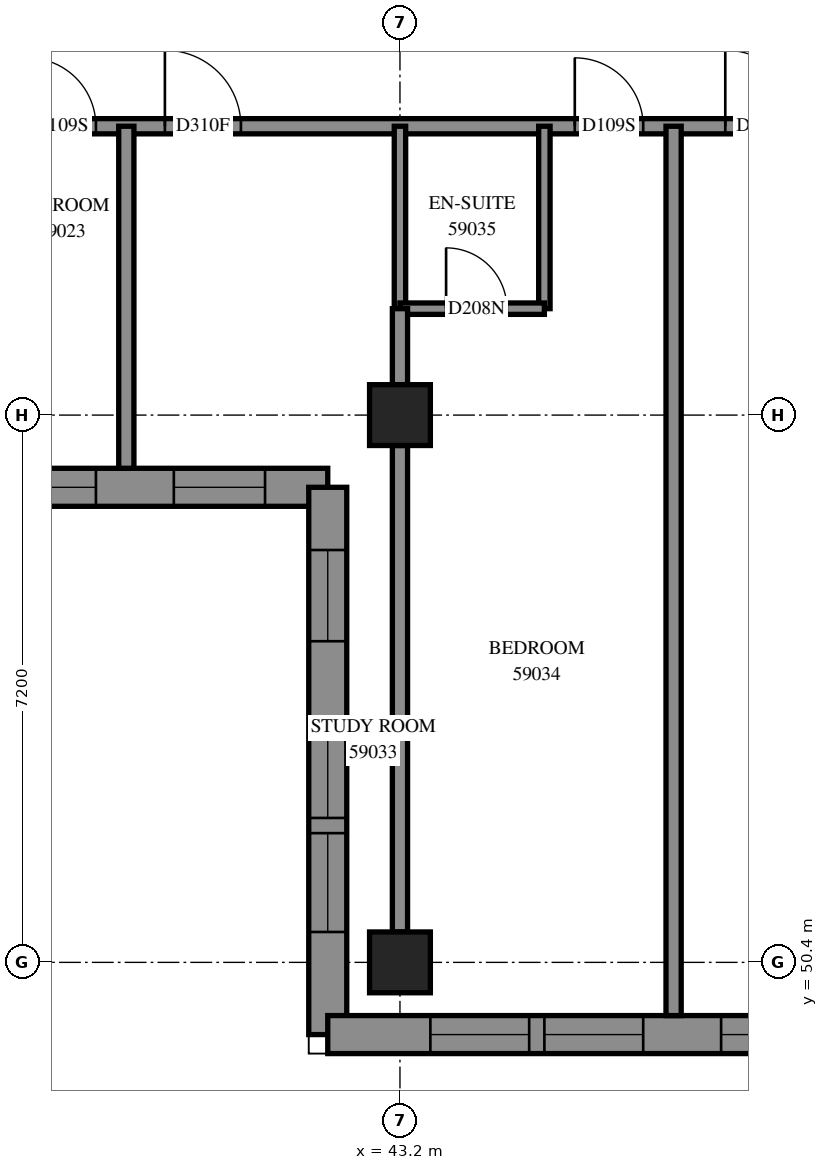
"""IFC4 building model, lengths in metres.
Left out: names, types, materials, properties, quantities, classifications, styles, units other than length and angle.
Written with IfcOpenShell. Run it as: python <this file> out.ifc"""

import sys

from ifc_helpers import new_model, si_unit, direction, frame, frame_2d, origin, origin_2d, place, context, subcontext, project, spatial, polyline, rectangle, outline, extrude, element, fill, save


model = new_model("IFC4")
c1 = context("Model", 3, precision=1e-05, world=origin(), true_north=direction((0.0, 1.0)))
c2 = subcontext(c1, "Body", "Model", "MODEL_VIEW")
j1 = project(units=[si_unit("LENGTHUNIT", "METRE"), si_unit("PLANEANGLEUNIT", "RADIAN")], contexts=[c1])
p1 = place(None, origin())
s1 = spatial("IfcSite", under=j1, at=p1, CompositionType="ELEMENT")
p2 = place(p1, origin())
s2 = spatial("IfcBuilding", under=s1, at=p2, CompositionType="ELEMENT")
p3 = place(p2, frame((0.0, 0.0, 216.8)))
s3 = spatial("IfcBuildingStorey", under=s2, at=p3, CompositionType="ELEMENT", Elevation=216.8)
for number, where, z_axis, x_axis in (
    (1, (43.2, 50.4, 0.0), (0.0, 0.0, 1.0), (1.0, 0.0, 0.0)),
    (2, (43.2, 57.6, 0.0), (0.0, 0.0, 1.0), (1.0, 0.0, 0.0)),
):
    element("IfcColumn", number, at=place(p3, frame(where, z_axis=z_axis, x_axis=x_axis)), inside=s3, PredefinedType="COLUMN", context=c2, shape_type="SweptSolid", body=[
        extrude(rectangle(XDim=0.8, YDim=0.8, at=origin_2d()), origin(), (0.0, 0.0, 1.0), 3.1),
    ])
p4 = place(p3, frame((35.05, 56.65, 0.0), z_axis=(0.0, 0.0, 1.0), x_axis=(1.0, 0.0, 0.0)))
e3 = element("IfcWall", 3, at=p4, inside=s3, PredefinedType="SOLIDWALL", context=c2, shape_type="SweptSolid", body=[
    extrude(outline(polyline([(-0.25, -0.25), (6.95, -0.25), (7.45, 0.25), (0.25, 0.25), (-0.25, -0.25)])), origin(), (0.0, 0.0, 1.0), 3.1),
])
p5 = place(p4, frame((1.35, 0.0, 0.45)))
e4 = element("IfcOpeningElement", 4, at=p5, cuts=e3, PredefinedType="OPENING", context=c2, shape_type="SweptSolid", body=[
    extrude(rectangle(XDim=1.3, YDim=2.5, at=frame_2d((0.65, 1.25))), frame((0.0, 0.26, 0.0), z_axis=(0.0, -1.0, 0.0), x_axis=(1.0, 0.0, 0.0)), (0.0, 0.0, 1.0), 0.52),
])
p6 = place(p4, frame((2.85, 0.0, 0.45)))
e5 = element("IfcOpeningElement", 5, at=p6, cuts=e3, PredefinedType="OPENING", context=c2, shape_type="SweptSolid", body=[
    extrude(rectangle(XDim=1.3, YDim=2.5, at=frame_2d((0.65, 1.25))), frame((0.0, 0.26, 0.0), z_axis=(0.0, -1.0, 0.0), x_axis=(1.0, 0.0, 0.0)), (0.0, 0.0, 1.0), 0.52),
])
p7 = place(p4, frame((5.175, 0.0, 0.45)))
e6 = element("IfcOpeningElement", 6, at=p7, cuts=e3, PredefinedType="OPENING", context=c2, shape_type="SweptSolid", body=[
    extrude(rectangle(XDim=1.2, YDim=2.5, at=frame_2d((0.6, 1.25))), frame((0.0, 0.26, 0.0), z_axis=(0.0, -1.0, 0.0), x_axis=(1.0, 0.0, 0.0)), (0.0, 0.0, 1.0), 0.52),
])
p8 = place(p3, frame((42.25, 56.65, 0.0), z_axis=(0.0, 0.0, 1.0), x_axis=(0.0, -1.0, 0.0)))
e7 = element("IfcWall", 7, at=p8, inside=s3, PredefinedType="SOLIDWALL", context=c2, shape_type="SweptSolid", body=[
    extrude(outline(polyline([(0.25, -0.25), (7.45, -0.25), (6.95, 0.25), (-0.25, 0.25), (0.25, -0.25)])), origin(), (0.0, 0.0, 1.0), 3.1),
])
p9 = place(p8, frame((3.05, 0.0, 0.45)))
e8 = element("IfcOpeningElement", 8, at=p9, cuts=e7, PredefinedType="OPENING", context=c2, shape_type="SweptSolid", body=[
    extrude(rectangle(XDim=1.3, YDim=2.5, at=frame_2d((0.65, 1.25))), frame((0.0, 0.26, 0.0), z_axis=(0.0, -1.0, 0.0), x_axis=(1.0, 0.0, 0.0)), (0.0, 0.0, 1.0), 0.52),
])
p10 = place(p8, frame((4.55, 0.0, 0.45)))
e9 = element("IfcOpeningElement", 9, at=p10, cuts=e7, PredefinedType="OPENING", context=c2, shape_type="SweptSolid", body=[
    extrude(rectangle(XDim=1.3, YDim=2.5, at=frame_2d((0.65, 1.25))), frame((0.0, 0.26, 0.0), z_axis=(0.0, -1.0, 0.0), x_axis=(1.0, 0.0, 0.0)), (0.0, 0.0, 1.0), 0.52),
])
p11 = place(p8, frame((0.825, 0.0, 0.45)))
e10 = element("IfcOpeningElement", 10, at=p11, cuts=e7, PredefinedType="OPENING", context=c2, shape_type="SweptSolid", body=[
    extrude(rectangle(XDim=1.2, YDim=2.5, at=frame_2d((0.6, 1.25))), frame((0.0, 0.26, 0.0), z_axis=(0.0, -1.0, 0.0), x_axis=(1.0, 0.0, 0.0)), (0.0, 0.0, 1.0), 0.52),
])
p12 = place(p3, frame((42.25, 49.45, 0.0), z_axis=(0.0, 0.0, 1.0), x_axis=(1.0, 0.0, 0.0)))
e11 = element("IfcWall", 11, at=p12, inside=s3, PredefinedType="SOLIDWALL", context=c2, shape_type="SweptSolid", body=[
    extrude(outline(polyline([(-0.25, -0.25), (6.95, -0.25), (7.45, 0.25), (0.25, 0.25), (-0.25, -0.25)])), origin(), (0.0, 0.0, 1.0), 3.1),
])
p13 = place(p12, frame((1.35, 0.0, 0.45)))
e12 = element("IfcOpeningElement", 12, at=p13, cuts=e11, PredefinedType="OPENING", context=c2, shape_type="SweptSolid", body=[
    extrude(rectangle(XDim=1.3, YDim=2.5, at=frame_2d((0.65, 1.25))), frame((0.0, 0.26, 0.0), z_axis=(0.0, -1.0, 0.0), x_axis=(1.0, 0.0, 0.0)), (0.0, 0.0, 1.0), 0.52),
])
p14 = place(p12, frame((2.85, 0.0, 0.45)))
e13 = element("IfcOpeningElement", 13, at=p14, cuts=e11, PredefinedType="OPENING", context=c2, shape_type="SweptSolid", body=[
    extrude(rectangle(XDim=1.3, YDim=2.5, at=frame_2d((0.65, 1.25))), frame((0.0, 0.26, 0.0), z_axis=(0.0, -1.0, 0.0), x_axis=(1.0, 0.0, 0.0)), (0.0, 0.0, 1.0), 0.52),
])
p15 = place(p12, frame((5.175, 0.0, 0.45)))
e14 = element("IfcOpeningElement", 14, at=p15, cuts=e11, PredefinedType="OPENING", context=c2, shape_type="SweptSolid", body=[
    extrude(rectangle(XDim=1.2, YDim=2.5, at=frame_2d((0.6, 1.25))), frame((0.0, 0.26, 0.0), z_axis=(0.0, -1.0, 0.0), x_axis=(1.0, 0.0, 0.0)), (0.0, 0.0, 1.0), 0.52),
])
p16 = place(p3, frame((36.0, 61.4, 0.0), z_axis=(0.0, 0.0, 1.0), x_axis=(1.0, 0.0, 0.0)))
e15 = element("IfcWall", 15, at=p16, inside=s3, PredefinedType="PARTITIONING", context=c2, shape_type="SweptSolid", body=[
    extrude(rectangle(XDim=17.0, YDim=0.2, at=frame_2d((8.5, 0.0))), origin(), (0.0, 0.0, 1.0), 3.1),
])
p17 = place(p16, frame((2.3, 0.0, 0.0)))
e16 = element("IfcOpeningElement", 16, at=p17, cuts=e15, PredefinedType="OPENING", context=c2, shape_type="SweptSolid", body=[
    extrude(rectangle(XDim=0.9, YDim=2.1, at=frame_2d((0.45, 1.05))), frame((0.0, 0.11, 0.0), z_axis=(0.0, -1.0, 0.0), x_axis=(1.0, 0.0, 0.0)), (0.0, 0.0, 1.0), 0.22),
])
p18 = place(p16, frame((4.107, 0.0, 0.0)))
e17 = element("IfcOpeningElement", 17, at=p18, cuts=e15, PredefinedType="OPENING", context=c2, shape_type="SweptSolid", body=[
    extrude(rectangle(XDim=1.0, YDim=2.1, at=frame_2d((0.5, 1.05))), frame((0.0, 0.11, 0.0), z_axis=(0.0, -1.0, 0.0), x_axis=(1.0, 0.0, 0.0)), (0.0, 0.0, 1.0), 0.22),
])
p19 = place(p16, frame((9.5, 0.0, 0.0)))
e18 = element("IfcOpeningElement", 18, at=p19, cuts=e15, PredefinedType="OPENING", context=c2, shape_type="SweptSolid", body=[
    extrude(rectangle(XDim=0.9, YDim=2.1, at=frame_2d((0.45, 1.05))), frame((0.0, 0.11, 0.0), z_axis=(0.0, -1.0, 0.0), x_axis=(1.0, 0.0, 0.0)), (0.0, 0.0, 1.0), 0.22),
])
p20 = place(p16, frame((11.48, 0.0, 0.0)))
e19 = element("IfcOpeningElement", 19, at=p20, cuts=e15, PredefinedType="OPENING", context=c2, shape_type="SweptSolid", body=[
    extrude(rectangle(XDim=1.0, YDim=2.1, at=frame_2d((0.5, 1.05))), frame((0.0, 0.11, 0.0), z_axis=(0.0, -1.0, 0.0), x_axis=(1.0, 0.0, 0.0)), (0.0, 0.0, 1.0), 0.22),
])
p21 = place(p16, frame((15.805, 0.0, 0.0)))
e20 = element("IfcOpeningElement", 20, at=p21, cuts=e15, PredefinedType="OPENING", context=c2, shape_type="SweptSolid", body=[
    extrude(rectangle(XDim=1.0, YDim=2.1, at=frame_2d((0.5, 1.05))), frame((0.0, 0.11, 0.0), z_axis=(0.0, -1.0, 0.0), x_axis=(1.0, 0.0, 0.0)), (0.0, 0.0, 1.0), 0.22),
])
p22 = place(p3, frame((46.8, 49.7, 0.0), z_axis=(0.0, 0.0, 1.0), x_axis=(0.0, 1.0, 0.0)))
e21 = element("IfcWall", 21, at=p22, inside=s3, PredefinedType="PARTITIONING", context=c2, shape_type="SweptSolid", body=[
    extrude(rectangle(XDim=11.7, YDim=0.2, at=frame_2d((5.85, 0.0))), origin(), (0.0, 0.0, 1.0), 3.1),
])
p23 = place(p3, frame((43.2, 50.8, 0.0), z_axis=(0.0, 0.0, 1.0), x_axis=(0.0, 1.0, 0.0)))
e22 = element("IfcWall", 22, at=p23, inside=s3, PredefinedType="PARTITIONING", context=c2, shape_type="SweptSolid", body=[
    extrude(rectangle(XDim=6.4, YDim=0.2, at=frame_2d((3.2, 0.0))), origin(), (0.0, 0.0, 1.0), 2.6),
])
p24 = place(p3, frame((39.6, 56.9, 0.0), z_axis=(0.0, 0.0, 1.0), x_axis=(0.0, 1.0, 0.0)))
e23 = element("IfcWall", 23, at=p24, inside=s3, PredefinedType="PARTITIONING", context=c2, shape_type="SweptSolid", body=[
    extrude(rectangle(XDim=4.5, YDim=0.2, at=frame_2d((2.25, 0.0))), origin(), (0.0, 0.0, 1.0), 3.1),
])
for number, where, z_axis, x_axis in (
    (24, (45.1, 59.0, 0.0), (0.0, 0.0, 1.0), (0.0, 1.0, 0.0)),
    (25, (43.2, 59.0, 0.0), (0.0, 0.0, 1.0), (0.0, 1.0, 0.0)),
):
    element("IfcWall", number, at=place(p3, frame(where, z_axis=z_axis, x_axis=x_axis)), inside=s3, PredefinedType="PARTITIONING", context=c2, shape_type="SweptSolid", body=[
        extrude(rectangle(XDim=2.4, YDim=0.15, at=frame_2d((1.2, 0.0))), origin(), (0.0, 0.0, 1.0), 3.1),
    ])
p25 = place(p3, frame((43.2, 59.0, 0.0), z_axis=(0.0, 0.0, 1.0), x_axis=(1.0, 0.0, 0.0)))
e26 = element("IfcWall", 26, at=p25, inside=s3, PredefinedType="PARTITIONING", context=c2, shape_type="SweptSolid", body=[
    extrude(rectangle(XDim=1.9, YDim=0.15, at=frame_2d((0.95, 0.0))), origin(), (0.0, 0.0, 1.0), 3.1),
])
p26 = place(p25, frame((0.607, 0.0, 0.0)))
e27 = element("IfcOpeningElement", 27, at=p26, cuts=e26, PredefinedType="OPENING", context=c2, shape_type="SweptSolid", body=[
    extrude(rectangle(XDim=0.8, YDim=2.1, at=frame_2d((0.4, 1.05))), frame((0.0, 0.085, 0.0), z_axis=(0.0, -1.0, 0.0), x_axis=(1.0, 0.0, 0.0)), (0.0, 0.0, 1.0), 0.17),
])
p27 = place(p3, frame((43.2, 58.0, 0.0), z_axis=(0.0, 0.0, 1.0), x_axis=(0.0, 1.0, 0.0)))
e28 = element("IfcWall", 28, at=p27, inside=s3, PredefinedType="PARTITIONING", context=c2, shape_type="SweptSolid", body=[
    extrude(rectangle(XDim=1.0, YDim=0.2, at=frame_2d((0.5, 0.0))), origin(), (0.0, 0.0, 1.0), 3.1),
])
p28 = place(p6, origin())
e29 = element("IfcWindow", 29, at=p28, inside=s3, PartitioningType="SINGLE_PANEL", PredefinedType="WINDOW", context=c2, shape_type="SweptSolid", body=[
    extrude(rectangle(XDim=1.3, YDim=2.5, at=frame_2d((0.65, 1.25))), frame((0.0, 0.18, 0.0), z_axis=(0.0, -1.0, 0.0), x_axis=(1.0, 0.0, 0.0)), (0.0, 0.0, 1.0), 0.06),
])
fill(e5, e29)
p29 = place(p7, origin())
e30 = element("IfcWindow", 30, at=p29, inside=s3, PartitioningType="SINGLE_PANEL", PredefinedType="WINDOW", context=c2, shape_type="SweptSolid", body=[
    extrude(rectangle(XDim=1.2, YDim=2.5, at=frame_2d((0.6, 1.25))), frame((0.0, 0.18, 0.0), z_axis=(0.0, -1.0, 0.0), x_axis=(1.0, 0.0, 0.0)), (0.0, 0.0, 1.0), 0.06),
])
fill(e6, e30)
p30 = place(p9, origin())
e31 = element("IfcWindow", 31, at=p30, inside=s3, PartitioningType="SINGLE_PANEL", PredefinedType="WINDOW", context=c2, shape_type="SweptSolid", body=[
    extrude(rectangle(XDim=1.3, YDim=2.5, at=frame_2d((0.65, 1.25))), frame((0.0, 0.18, 0.0), z_axis=(0.0, -1.0, 0.0), x_axis=(1.0, 0.0, 0.0)), (0.0, 0.0, 1.0), 0.06),
])
fill(e8, e31)
p31 = place(p10, origin())
e32 = element("IfcWindow", 32, at=p31, inside=s3, PartitioningType="SINGLE_PANEL", PredefinedType="WINDOW", context=c2, shape_type="SweptSolid", body=[
    extrude(rectangle(XDim=1.3, YDim=2.5, at=frame_2d((0.65, 1.25))), frame((0.0, 0.18, 0.0), z_axis=(0.0, -1.0, 0.0), x_axis=(1.0, 0.0, 0.0)), (0.0, 0.0, 1.0), 0.06),
])
fill(e9, e32)
p32 = place(p11, origin())
e33 = element("IfcWindow", 33, at=p32, inside=s3, PartitioningType="SINGLE_PANEL", PredefinedType="WINDOW", context=c2, shape_type="SweptSolid", body=[
    extrude(rectangle(XDim=1.2, YDim=2.5, at=frame_2d((0.6, 1.25))), frame((0.0, 0.18, 0.0), z_axis=(0.0, -1.0, 0.0), x_axis=(1.0, 0.0, 0.0)), (0.0, 0.0, 1.0), 0.06),
])
fill(e10, e33)
p33 = place(p13, origin())
e34 = element("IfcWindow", 34, at=p33, inside=s3, PartitioningType="SINGLE_PANEL", PredefinedType="WINDOW", context=c2, shape_type="SweptSolid", body=[
    extrude(rectangle(XDim=1.3, YDim=2.5, at=frame_2d((0.65, 1.25))), frame((0.0, 0.18, 0.0), z_axis=(0.0, -1.0, 0.0), x_axis=(1.0, 0.0, 0.0)), (0.0, 0.0, 1.0), 0.06),
])
fill(e12, e34)
p34 = place(p14, origin())
e35 = element("IfcWindow", 35, at=p34, inside=s3, PartitioningType="SINGLE_PANEL", PredefinedType="WINDOW", context=c2, shape_type="SweptSolid", body=[
    extrude(rectangle(XDim=1.3, YDim=2.5, at=frame_2d((0.65, 1.25))), frame((0.0, 0.18, 0.0), z_axis=(0.0, -1.0, 0.0), x_axis=(1.0, 0.0, 0.0)), (0.0, 0.0, 1.0), 0.06),
])
fill(e13, e35)
p35 = place(p15, origin())
e36 = element("IfcWindow", 36, at=p35, inside=s3, PartitioningType="SINGLE_PANEL", PredefinedType="WINDOW", context=c2, shape_type="SweptSolid", body=[
    extrude(rectangle(XDim=1.2, YDim=2.5, at=frame_2d((0.6, 1.25))), frame((0.0, 0.18, 0.0), z_axis=(0.0, -1.0, 0.0), x_axis=(1.0, 0.0, 0.0)), (0.0, 0.0, 1.0), 0.06),
])
fill(e14, e36)
p36 = place(p17, origin())
e37 = element("IfcDoor", 37, at=p36, inside=s3, OperationType="SINGLE_SWING_LEFT", PredefinedType="DOOR", context=c2, shape_type="SweptSolid", body=[
    extrude(rectangle(XDim=0.9, YDim=2.1, at=frame_2d((0.45, 1.05))), frame((0.0, 0.025, 0.0), z_axis=(0.0, -1.0, 0.0), x_axis=(1.0, 0.0, 0.0)), (0.0, 0.0, 1.0), 0.05),
])
fill(e16, e37)
p37 = place(p18, origin())
e38 = element("IfcDoor", 38, at=p37, inside=s3, OperationType="SINGLE_SWING_RIGHT", PredefinedType="DOOR", context=c2, shape_type="SweptSolid", body=[
    extrude(rectangle(XDim=1.0, YDim=2.1, at=frame_2d((0.5, 1.05))), frame((0.0, 0.025, 0.0), z_axis=(0.0, -1.0, 0.0), x_axis=(1.0, 0.0, 0.0)), (0.0, 0.0, 1.0), 0.05),
])
fill(e17, e38)
p38 = place(p19, origin())
e39 = element("IfcDoor", 39, at=p38, inside=s3, OperationType="SINGLE_SWING_LEFT", PredefinedType="DOOR", context=c2, shape_type="SweptSolid", body=[
    extrude(rectangle(XDim=0.9, YDim=2.1, at=frame_2d((0.45, 1.05))), frame((0.0, 0.025, 0.0), z_axis=(0.0, -1.0, 0.0), x_axis=(1.0, 0.0, 0.0)), (0.0, 0.0, 1.0), 0.05),
])
fill(e18, e39)
p39 = place(p26, origin())
e40 = element("IfcDoor", 40, at=p39, inside=s3, OperationType="SINGLE_SWING_RIGHT", PredefinedType="DOOR", context=c2, shape_type="SweptSolid", body=[
    extrude(rectangle(XDim=0.8, YDim=2.1, at=frame_2d((0.4, 1.05))), frame((0.0, 0.025, 0.0), z_axis=(0.0, -1.0, 0.0), x_axis=(1.0, 0.0, 0.0)), (0.0, 0.0, 1.0), 0.05),
])
fill(e27, e40)
p40 = place(p20, origin())
e41 = element("IfcDoor", 41, at=p40, inside=s3, OperationType="SINGLE_SWING_RIGHT", PredefinedType="DOOR", context=c2, shape_type="SweptSolid", body=[
    extrude(rectangle(XDim=1.0, YDim=2.1, at=frame_2d((0.5, 1.05))), frame((0.0, 0.025, 0.0), z_axis=(0.0, -1.0, 0.0), x_axis=(1.0, 0.0, 0.0)), (0.0, 0.0, 1.0), 0.05),
])
fill(e19, e41)
save(model, sys.argv[1])
